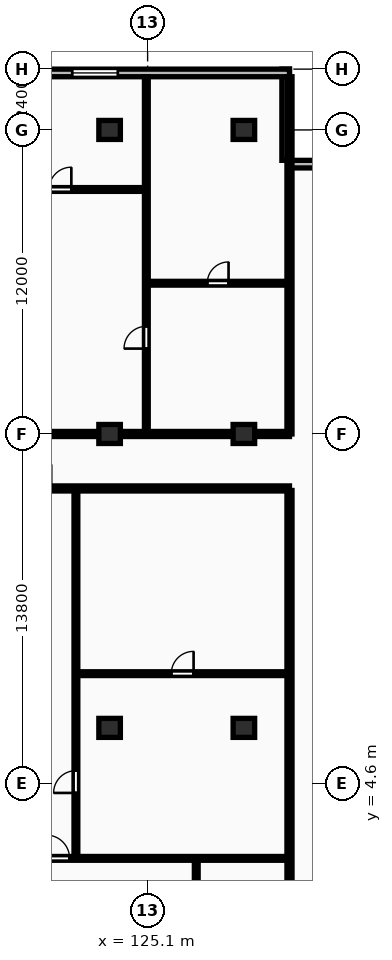
"""IFC4 building model, lengths in metres.
Left out: names, types, materials, properties, quantities, classifications, styles, units other than length and angle.
Written with IfcOpenShell. Run it as: python <this file> out.ifc"""

import sys

from ifc_helpers import new_model, si_unit, direction, frame, frame_2d, origin, origin_2d, place, context, subcontext, project, spatial, rectangle, extrude, element, fill, save


model = new_model("IFC4")
c1 = context("Model", 3, precision=1e-05, world=origin(), true_north=direction((0.0, 1.0)))
c2 = subcontext(c1, "Body", "Model", "MODEL_VIEW")
j1 = project(units=[si_unit("LENGTHUNIT", "METRE"), si_unit("PLANEANGLEUNIT", "RADIAN")], contexts=[c1])
p1 = place(None, origin())
s1 = spatial("IfcSite", under=j1, at=p1, CompositionType="ELEMENT")
p2 = place(p1, origin())
s2 = spatial("IfcBuilding", under=s1, at=p2, CompositionType="ELEMENT")
p3 = place(p2, frame((0.0, 0.0, 80.8)))
s3 = spatial("IfcBuildingStorey", under=s2, at=p3, CompositionType="ELEMENT", Elevation=80.8)
for number, where, z_axis, x_axis in (
    (1, (123.6, 6.8, 0.0), (0.0, 0.0, 1.0), (1.0, 0.0, 0.0)),
    (2, (123.6, 18.4, 0.0), (0.0, 0.0, 1.0), (1.0, 0.0, 0.0)),
    (3, (123.6, 30.4, 0.0), (0.0, 0.0, 1.0), (1.0, 0.0, 0.0)),
    (4, (128.9, 6.8, 0.0), (0.0, 0.0, 1.0), (1.0, 0.0, 0.0)),
    (5, (128.9, 18.4, 0.0), (0.0, 0.0, 1.0), (1.0, 0.0, 0.0)),
    (6, (128.9, 30.4, 0.0), (0.0, 0.0, 1.0), (1.0, 0.0, 0.0)),
):
    element("IfcColumn", number, at=place(p3, frame(where, z_axis=z_axis, x_axis=x_axis)), inside=s3, PredefinedType="COLUMN", context=c2, shape_type="SweptSolid", body=[
        extrude(rectangle(XDim=0.85, YDim=0.75, at=origin_2d()), origin(), (0.0, 0.0, 1.0), 3.25),
    ])
for number, where, z_axis, x_axis in (
    (7, (134.3, 29.05, 0.0), (0.0, 0.0, 1.0), (-1.0, 0.0, 0.0)),
    (8, (130.55, 29.2, 0.0), (0.0, 0.0, 1.0), (0.0, 1.0, 0.0)),
):
    element("IfcWall", number, at=place(p3, frame(where, z_axis=z_axis, x_axis=x_axis)), inside=s3, PredefinedType="STANDARD", context=c2, shape_type="SweptSolid", body=[
        extrude(rectangle(XDim=3.6, YDim=0.3, at=frame_2d((1.8, 0.0))), origin(), (0.0, 0.0, 1.0), 2.97),
    ])
p4 = place(p3, frame((130.7, 32.65, 0.0), z_axis=(0.0, 0.0, 1.0), x_axis=(-1.0, 0.0, 0.0)))
e9 = element("IfcWall", 9, at=p4, inside=s3, PredefinedType="STANDARD", context=c2, shape_type="SweptSolid", body=[
    extrude(rectangle(XDim=58.0, YDim=0.3, at=frame_2d((29.0, 0.0))), origin(), (0.0, 0.0, 1.0), 2.97),
])
p5 = place(p4, frame((50.125, 0.0, 0.85)))
e10 = element("IfcOpeningElement", 10, at=p5, cuts=e9, PredefinedType="OPENING", context=c2, shape_type="SweptSolid", body=[
    extrude(rectangle(XDim=1.8, YDim=1.8, at=frame_2d((0.9, 0.9))), frame((0.0, 0.16, 0.0), z_axis=(0.0, -1.0, 0.0), x_axis=(1.0, 0.0, 0.0)), (0.0, 0.0, 1.0), 0.32),
])
p6 = place(p4, frame((6.775, 0.0, 0.85)))
e11 = element("IfcOpeningElement", 11, at=p6, cuts=e9, PredefinedType="OPENING", context=c2, shape_type="SweptSolid", body=[
    extrude(rectangle(XDim=1.8, YDim=1.8, at=frame_2d((0.9, 0.9))), frame((0.0, 0.16, 0.0), z_axis=(0.0, -1.0, 0.0), x_axis=(1.0, 0.0, 0.0)), (0.0, 0.0, 1.0), 0.32),
])
p7 = place(p3, frame((130.7, 18.4, 0.0), z_axis=(0.0, 0.0, 1.0), x_axis=(0.0, 1.0, 0.0)))
e12 = element("IfcWall", 12, at=p7, inside=s3, PredefinedType="PARTITIONING", context=c2, shape_type="SweptSolid", body=[
    extrude(rectangle(XDim=14.1, YDim=0.2, at=frame_2d((7.05, 0.0))), origin(), (0.0, 0.0, 1.0), 2.97),
])
p8 = place(p3, frame((125.05, 24.35, 0.0), z_axis=(0.0, 0.0, 1.0), x_axis=(1.0, 0.0, 0.0)))
e13 = element("IfcWall", 13, at=p8, inside=s3, PredefinedType="PARTITIONING", context=c2, shape_type="SweptSolid", body=[
    extrude(rectangle(XDim=5.65, YDim=0.15, at=frame_2d((2.825, 0.0))), origin(), (0.0, 0.0, 1.0), 2.97),
])
p9 = place(p8, frame((2.405, 0.0, 0.0)))
e14 = element("IfcOpeningElement", 14, at=p9, cuts=e13, PredefinedType="OPENING", context=c2, shape_type="SweptSolid", body=[
    extrude(rectangle(XDim=0.84, YDim=2.04, at=frame_2d((0.42, 1.02))), frame((0.0, 0.085, 0.0), z_axis=(0.0, -1.0, 0.0), x_axis=(1.0, 0.0, 0.0)), (0.0, 0.0, 1.0), 0.17),
])
p10 = place(p3, frame((125.05, 18.45, 0.0), z_axis=(0.0, 0.0, 1.0), x_axis=(0.0, 1.0, 0.0)))
e15 = element("IfcWall", 15, at=p10, inside=s3, PredefinedType="PARTITIONING", context=c2, shape_type="SweptSolid", body=[
    extrude(rectangle(XDim=14.05, YDim=0.15, at=frame_2d((7.025, 0.0))), origin(), (0.0, 0.0, 1.0), 2.97),
])
p11 = place(p10, frame((3.32, 0.0, 0.0)))
e16 = element("IfcOpeningElement", 16, at=p11, cuts=e15, PredefinedType="OPENING", context=c2, shape_type="SweptSolid", body=[
    extrude(rectangle(XDim=0.88, YDim=2.06, at=frame_2d((0.44, 1.03))), frame((0.0, 0.085, 0.0), z_axis=(0.0, -1.0, 0.0), x_axis=(1.0, 0.0, 0.0)), (0.0, 0.0, 1.0), 0.17),
])
p12 = place(p3, frame((118.27, 28.05, 0.0), z_axis=(0.0, 0.0, 1.0), x_axis=(1.0, 0.0, 0.0)))
e17 = element("IfcWall", 17, at=p12, inside=s3, PredefinedType="PARTITIONING", context=c2, shape_type="SweptSolid", body=[
    extrude(rectangle(XDim=6.76, YDim=0.15, at=frame_2d((3.38, 0.0))), origin(), (0.0, 0.0, 1.0), 2.97),
])
p13 = place(p12, frame((1.587, 0.0, 0.0)))
e18 = element("IfcOpeningElement", 18, at=p13, cuts=e17, PredefinedType="OPENING", context=c2, shape_type="SweptSolid", body=[
    extrude(rectangle(XDim=0.84, YDim=2.04, at=frame_2d((0.42, 1.02))), frame((0.0, 0.085, 0.0), z_axis=(0.0, -1.0, 0.0), x_axis=(1.0, 0.0, 0.0)), (0.0, 0.0, 1.0), 0.17),
])
p14 = place(p12, frame((2.94, 0.0, 0.0)))
e19 = element("IfcOpeningElement", 19, at=p14, cuts=e17, PredefinedType="OPENING", context=c2, shape_type="SweptSolid", body=[
    extrude(rectangle(XDim=0.88, YDim=2.06, at=frame_2d((0.44, 1.03))), frame((0.0, 0.085, 0.0), z_axis=(0.0, -1.0, 0.0), x_axis=(1.0, 0.0, 0.0)), (0.0, 0.0, 1.0), 0.17),
])
p15 = place(p3, frame((118.25, 18.4, 0.0), z_axis=(0.0, 0.0, 1.0), x_axis=(1.0, 0.0, 0.0)))
e20 = element("IfcWall", 20, at=p15, inside=s3, PredefinedType="PARTITIONING", context=c2, shape_type="SweptSolid", body=[
    extrude(rectangle(XDim=12.45, YDim=0.2, at=frame_2d((6.225, 0.0))), origin(), (0.0, 0.0, 1.0), 2.358),
])
p16 = place(p15, frame((1.51, 0.0, 0.0)))
e21 = element("IfcOpeningElement", 21, at=p16, cuts=e20, PredefinedType="OPENING", context=c2, shape_type="SweptSolid", body=[
    extrude(rectangle(XDim=0.95, YDim=2.15, at=frame_2d((0.475, 1.075))), frame((0.0, 0.11, 0.0), z_axis=(0.0, -1.0, 0.0), x_axis=(1.0, 0.0, 0.0)), (0.0, 0.0, 1.0), 0.22),
])
p17 = place(p3, frame((130.7, -8.7, 0.0), z_axis=(0.0, 0.0, 1.0), x_axis=(0.0, 1.0, 0.0)))
e22 = element("IfcWall", 22, at=p17, inside=s3, PredefinedType="PARTITIONING", context=c2, shape_type="SweptSolid", body=[
    extrude(rectangle(XDim=24.87, YDim=0.2, at=frame_2d((12.435, 0.0))), origin(), (0.0, 0.0, 1.0), 2.97),
])
p18 = place(p3, frame((122.33, 8.94, 0.0), z_axis=(0.0, 0.0, 1.0), x_axis=(1.0, 0.0, 0.0)))
e23 = element("IfcWall", 23, at=p18, inside=s3, PredefinedType="PARTITIONING", context=c2, shape_type="SweptSolid", body=[
    extrude(rectangle(XDim=8.29, YDim=0.15, at=frame_2d((4.145, 0.0))), origin(), (0.0, 0.0, 1.0), 2.97),
])
p19 = place(p18, frame((3.705, 0.0, 0.0)))
e24 = element("IfcOpeningElement", 24, at=p19, cuts=e23, PredefinedType="OPENING", context=c2, shape_type="SweptSolid", body=[
    extrude(rectangle(XDim=0.88, YDim=2.06, at=frame_2d((0.44, 1.03))), frame((0.0, 0.085, 0.0), z_axis=(0.0, -1.0, 0.0), x_axis=(1.0, 0.0, 0.0)), (0.0, 0.0, 1.0), 0.17),
])
p20 = place(p3, frame((122.27, 1.69, 0.0), z_axis=(0.0, 0.0, 1.0), x_axis=(0.0, 1.0, 0.0)))
e25 = element("IfcWall", 25, at=p20, inside=s3, PredefinedType="PARTITIONING", context=c2, shape_type="SweptSolid", body=[
    extrude(rectangle(XDim=14.5, YDim=0.15, at=frame_2d((7.25, 0.0))), origin(), (0.0, 0.0, 1.0), 2.97),
])
p21 = place(p20, frame((2.542, 0.0, 0.0)))
e26 = element("IfcOpeningElement", 26, at=p21, cuts=e25, PredefinedType="OPENING", context=c2, shape_type="SweptSolid", body=[
    extrude(rectangle(XDim=0.88, YDim=2.06, at=frame_2d((0.44, 1.03))), frame((0.0, 0.085, 0.0), z_axis=(0.0, -1.0, 0.0), x_axis=(1.0, 0.0, 0.0)), (0.0, 0.0, 1.0), 0.17),
])
p22 = place(p3, frame((127.02, -8.7, 0.0), z_axis=(0.0, 0.0, 1.0), x_axis=(0.0, 1.0, 0.0)))
e27 = element("IfcWall", 27, at=p22, inside=s3, PredefinedType="PARTITIONING", context=c2, shape_type="SweptSolid", body=[
    extrude(rectangle(XDim=10.31, YDim=0.15, at=frame_2d((5.155, 0.0))), origin(), (0.0, 0.0, 1.0), 2.97),
])
p23 = place(p22, frame((6.12, 0.0, 0.0)))
e28 = element("IfcOpeningElement", 28, at=p23, cuts=e27, PredefinedType="OPENING", context=c2, shape_type="SweptSolid", body=[
    extrude(rectangle(XDim=0.84, YDim=2.04, at=frame_2d((0.42, 1.02))), frame((0.0, 0.085, 0.0), z_axis=(0.0, -1.0, 0.0), x_axis=(1.0, 0.0, 0.0)), (0.0, 0.0, 1.0), 0.17),
])
p24 = place(p22, frame((8.04, 0.0, 0.0)))
e29 = element("IfcOpeningElement", 29, at=p24, cuts=e27, PredefinedType="OPENING", context=c2, shape_type="SweptSolid", body=[
    extrude(rectangle(XDim=0.84, YDim=2.04, at=frame_2d((0.42, 1.02))), frame((0.0, 0.085, 0.0), z_axis=(0.0, -1.0, 0.0), x_axis=(1.0, 0.0, 0.0)), (0.0, 0.0, 1.0), 0.17),
])
p25 = place(p22, frame((2.001, 0.0, 0.0)))
e30 = element("IfcOpeningElement", 30, at=p25, cuts=e27, PredefinedType="OPENING", context=c2, shape_type="SweptSolid", body=[
    extrude(rectangle(XDim=0.88, YDim=2.06, at=frame_2d((0.44, 1.03))), frame((0.0, 0.085, 0.0), z_axis=(0.0, -1.0, 0.0), x_axis=(1.0, 0.0, 0.0)), (0.0, 0.0, 1.0), 0.17),
])
p26 = place(p3, frame((118.38, 1.65, 0.0), z_axis=(0.0, 0.0, 1.0), x_axis=(1.0, 0.0, 0.0)))
e31 = element("IfcWall", 31, at=p26, inside=s3, PredefinedType="PARTITIONING", context=c2, shape_type="SweptSolid", body=[
    extrude(rectangle(XDim=12.24, YDim=0.15, at=frame_2d((6.12, 0.0))), origin(), (0.0, 0.0, 1.0), 2.97),
])
p27 = place(p26, frame((2.72, 0.0, 0.0)))
e32 = element("IfcOpeningElement", 32, at=p27, cuts=e31, PredefinedType="OPENING", context=c2, shape_type="SweptSolid", body=[
    extrude(rectangle(XDim=0.92, YDim=2.08, at=frame_2d((0.46, 1.04))), frame((0.0, 0.085, 0.0), z_axis=(0.0, -1.0, 0.0), x_axis=(1.0, 0.0, 0.0)), (0.0, 0.0, 1.0), 0.17),
])
p28 = place(p3, frame((72.7, 16.25, 0.0), z_axis=(0.0, 0.0, 1.0), x_axis=(1.0, 0.0, 0.0)))
e33 = element("IfcWall", 33, at=p28, inside=s3, PredefinedType="PARTITIONING", context=c2, shape_type="SweptSolid", body=[
    extrude(rectangle(XDim=58.0, YDim=0.2, at=frame_2d((29.0, 0.0))), origin(), (0.0, 0.0, 1.0), 2.97),
])
p29 = place(p28, frame((2.77, 0.0, 0.0)))
e34 = element("IfcOpeningElement", 34, at=p29, cuts=e33, PredefinedType="OPENING", context=c2, shape_type="SweptSolid", body=[
    extrude(rectangle(XDim=0.95, YDim=2.15, at=frame_2d((0.475, 1.075))), frame((0.0, 0.11, 0.0), z_axis=(0.0, -1.0, 0.0), x_axis=(1.0, 0.0, 0.0)), (0.0, 0.0, 1.0), 0.22),
])
p30 = place(p28, frame((15.445, 0.0, 0.0)))
e35 = element("IfcOpeningElement", 35, at=p30, cuts=e33, PredefinedType="OPENING", context=c2, shape_type="SweptSolid", body=[
    extrude(rectangle(XDim=0.95, YDim=2.15, at=frame_2d((0.475, 1.075))), frame((0.0, 0.11, 0.0), z_axis=(0.0, -1.0, 0.0), x_axis=(1.0, 0.0, 0.0)), (0.0, 0.0, 1.0), 0.22),
])
p31 = place(p28, frame((33.245, 0.0, 0.0)))
e36 = element("IfcOpeningElement", 36, at=p31, cuts=e33, PredefinedType="OPENING", context=c2, shape_type="SweptSolid", body=[
    extrude(rectangle(XDim=0.95, YDim=2.15, at=frame_2d((0.475, 1.075))), frame((0.0, 0.11, 0.0), z_axis=(0.0, -1.0, 0.0), x_axis=(1.0, 0.0, 0.0)), (0.0, 0.0, 1.0), 0.22),
])
p32 = place(p28, frame((47.645, 0.0, 0.0)))
e37 = element("IfcOpeningElement", 37, at=p32, cuts=e33, PredefinedType="OPENING", context=c2, shape_type="SweptSolid", body=[
    extrude(rectangle(XDim=0.95, YDim=2.15, at=frame_2d((0.475, 1.075))), frame((0.0, 0.11, 0.0), z_axis=(0.0, -1.0, 0.0), x_axis=(1.0, 0.0, 0.0)), (0.0, 0.0, 1.0), 0.22),
])
p33 = place(p6, origin())
e38 = element("IfcWindow", 38, at=p33, inside=s3, PartitioningType="SINGLE_PANEL", PredefinedType="WINDOW", context=c2, shape_type="SweptSolid", body=[
    extrude(rectangle(XDim=1.8, YDim=1.8, at=frame_2d((0.9, 0.9))), frame((0.0, 0.03, 0.0), z_axis=(0.0, -1.0, 0.0), x_axis=(1.0, 0.0, 0.0)), (0.0, 0.0, 1.0), 0.06),
])
fill(e11, e38)
p34 = place(p9, origin())
e39 = element("IfcDoor", 39, at=p34, inside=s3, OperationType="SINGLE_SWING_RIGHT", PredefinedType="DOOR", context=c2, shape_type="SweptSolid", body=[
    extrude(rectangle(XDim=0.84, YDim=2.04, at=frame_2d((0.42, 1.02))), frame((0.0, 0.025, 0.0), z_axis=(0.0, -1.0, 0.0), x_axis=(1.0, 0.0, 0.0)), (0.0, 0.0, 1.0), 0.05),
])
fill(e14, e39)
p35 = place(p11, origin())
e40 = element("IfcDoor", 40, at=p35, inside=s3, OperationType="SINGLE_SWING_LEFT", PredefinedType="DOOR", context=c2, shape_type="SweptSolid", body=[
    extrude(rectangle(XDim=0.88, YDim=2.06, at=frame_2d((0.44, 1.03))), frame((0.0, 0.025, 0.0), z_axis=(0.0, -1.0, 0.0), x_axis=(1.0, 0.0, 0.0)), (0.0, 0.0, 1.0), 0.05),
])
fill(e16, e40)
p36 = place(p14, origin())
e41 = element("IfcDoor", 41, at=p36, inside=s3, OperationType="SINGLE_SWING_RIGHT", PredefinedType="DOOR", context=c2, shape_type="SweptSolid", body=[
    extrude(rectangle(XDim=0.88, YDim=2.06, at=frame_2d((0.44, 1.03))), frame((0.0, 0.025, 0.0), z_axis=(0.0, -1.0, 0.0), x_axis=(1.0, 0.0, 0.0)), (0.0, 0.0, 1.0), 0.05),
])
fill(e19, e41)
p37 = place(p19, origin())
e42 = element("IfcDoor", 42, at=p37, inside=s3, OperationType="SINGLE_SWING_RIGHT", PredefinedType="DOOR", context=c2, shape_type="SweptSolid", body=[
    extrude(rectangle(XDim=0.88, YDim=2.06, at=frame_2d((0.44, 1.03))), frame((0.0, 0.025, 0.0), z_axis=(0.0, -1.0, 0.0), x_axis=(1.0, 0.0, 0.0)), (0.0, 0.0, 1.0), 0.05),
])
fill(e24, e42)
p38 = place(p21, origin())
e43 = element("IfcDoor", 43, at=p38, inside=s3, OperationType="SINGLE_SWING_LEFT", PredefinedType="DOOR", context=c2, shape_type="SweptSolid", body=[
    extrude(rectangle(XDim=0.88, YDim=2.06, at=frame_2d((0.44, 1.03))), frame((0.0, 0.025, 0.0), z_axis=(0.0, -1.0, 0.0), x_axis=(1.0, 0.0, 0.0)), (0.0, 0.0, 1.0), 0.05),
])
fill(e26, e43)
p39 = place(p27, origin())
e44 = element("IfcDoor", 44, at=p39, inside=s3, OperationType="SINGLE_SWING_LEFT", PredefinedType="DOOR", context=c2, shape_type="SweptSolid", body=[
    extrude(rectangle(XDim=0.92, YDim=2.08, at=frame_2d((0.46, 1.04))), frame((0.0, 0.025, 0.0), z_axis=(0.0, -1.0, 0.0), x_axis=(1.0, 0.0, 0.0)), (0.0, 0.0, 1.0), 0.05),
])
fill(e32, e44)
save(model, sys.argv[1])
